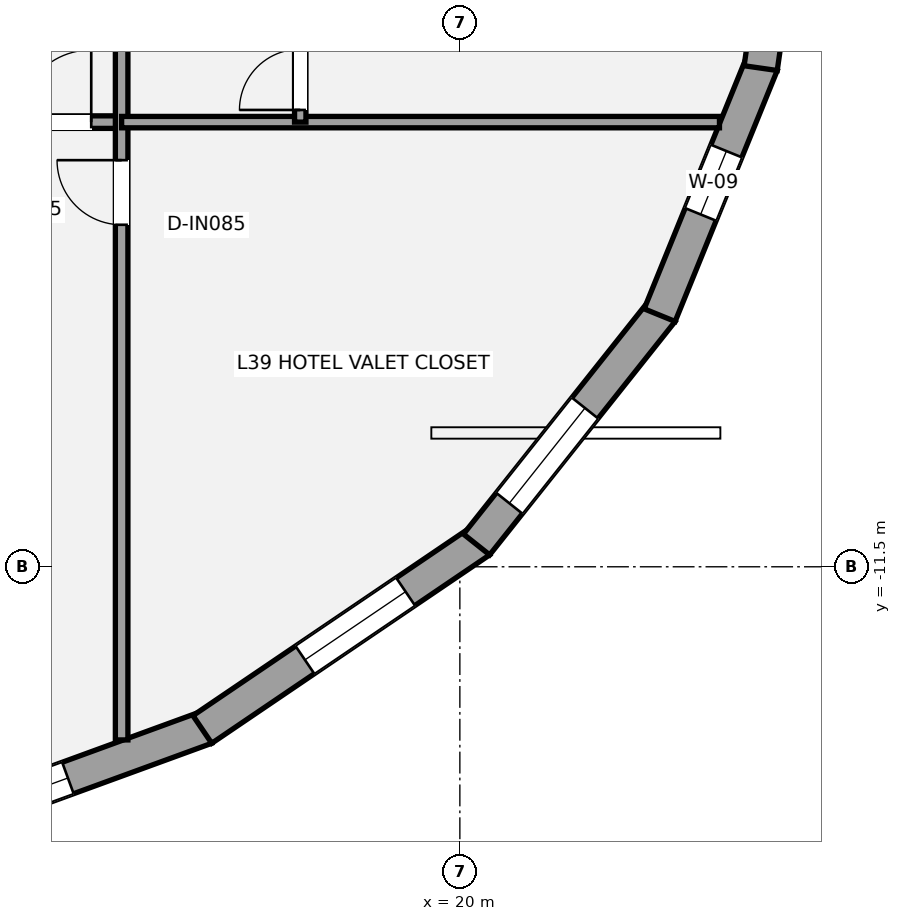
"""IFC4 building model, lengths in metres.
Left out: names, types, materials, properties, quantities, classifications, styles, units other than length and angle.
Written with IfcOpenShell. Run it as: python <this file> out.ifc"""

import sys

from ifc_helpers import new_model, si_unit, direction, frame, frame_2d, origin, place, context, subcontext, project, spatial, rectangle, extrude, element, fill, save


model = new_model("IFC4")
c1 = context("Model", 3, precision=1e-05, world=origin(), true_north=direction((0.0, 1.0)))
c2 = subcontext(c1, "Body", "Model", "MODEL_VIEW")
j1 = project(units=[si_unit("LENGTHUNIT", "METRE"), si_unit("PLANEANGLEUNIT", "RADIAN")], contexts=[c1])
p1 = place(None, origin())
s1 = spatial("IfcSite", under=j1, at=p1, CompositionType="ELEMENT")
p2 = place(p1, origin())
s2 = spatial("IfcBuilding", under=s1, at=p2, CompositionType="ELEMENT")
p3 = place(p2, frame((0.0, 0.0, 147.0)))
s3 = spatial("IfcBuildingStorey", under=s2, at=p3, CompositionType="ELEMENT", Elevation=147.0)
p4 = place(p3, frame((16.66, -13.615, 0.0), z_axis=(0.0, 0.0, 1.0), x_axis=(-0.939349296455, -0.342961950147, 0.0)))
e1 = element("IfcWall", 1, at=p4, inside=s3, PredefinedType="STANDARD", context=c2, shape_type="SweptSolid", body=[
    extrude(rectangle(XDim=4.823, YDim=0.44, at=frame_2d((2.412, 0.0))), origin(), (0.0, 0.0, 1.0), 2.315),
])
p5 = place(p4, frame((1.934, 0.0, 0.58)))
e2 = element("IfcOpeningElement", 2, at=p5, cuts=e1, PredefinedType="OPENING", context=c2, shape_type="SweptSolid", body=[
    extrude(rectangle(XDim=1.6, YDim=1.55, at=frame_2d((0.8, 0.775))), frame((0.0, 0.23, 0.0), z_axis=(0.0, -1.0, 0.0), x_axis=(1.0, 0.0, 0.0)), (0.0, 0.0, 1.0), 0.46),
])
p6 = place(p3, frame((20.269, -11.162, 0.0), z_axis=(0.0, 0.0, 1.0), x_axis=(-0.827774624611, -0.561060755044, 0.0)))
e3 = element("IfcWall", 3, at=p6, inside=s3, PredefinedType="STANDARD", context=c2, shape_type="SweptSolid", body=[
    extrude(rectangle(XDim=4.417, YDim=0.44, at=frame_2d((2.209, 0.0))), origin(), (0.0, 0.0, 1.0), 2.315),
])
p7 = place(p6, frame((1.187, 0.0, 0.58)))
e4 = element("IfcOpeningElement", 4, at=p7, cuts=e3, PredefinedType="OPENING", context=c2, shape_type="SweptSolid", body=[
    extrude(rectangle(XDim=1.6, YDim=1.55, at=frame_2d((0.8, 0.775))), frame((0.0, 0.23, 0.0), z_axis=(0.0, -1.0, 0.0), x_axis=(1.0, 0.0, 0.0)), (0.0, 0.0, 1.0), 0.46),
])
p8 = place(p3, frame((22.66, -8.135, 0.0), z_axis=(0.0, 0.0, 1.0), x_axis=(-0.622149266174, -0.782898646441, 0.0)))
e5 = element("IfcWall", 5, at=p8, inside=s3, PredefinedType="STANDARD", context=c2, shape_type="SweptSolid", body=[
    extrude(rectangle(XDim=3.923, YDim=0.44, at=frame_2d((1.961, 0.0))), origin(), (0.0, 0.0, 1.0), 2.315),
])
p9 = place(p8, frame((1.63, 0.0, 0.58)))
e6 = element("IfcOpeningElement", 6, at=p9, cuts=e5, PredefinedType="OPENING", context=c2, shape_type="SweptSolid", body=[
    extrude(rectangle(XDim=1.6, YDim=1.55, at=frame_2d((0.8, 0.775))), frame((0.0, 0.23, 0.0), z_axis=(0.0, -1.0, 0.0), x_axis=(1.0, 0.0, 0.0)), (0.0, 0.0, 1.0), 0.46),
])
p10 = place(p3, frame((23.972, -4.888, 0.0), z_axis=(0.0, 0.0, 1.0), x_axis=(-0.376863872061, -0.926268655378, 0.0)))
e7 = element("IfcWall", 7, at=p10, inside=s3, PredefinedType="STANDARD", context=c2, shape_type="SweptSolid", body=[
    extrude(rectangle(XDim=3.564, YDim=0.44, at=frame_2d((1.782, 0.0))), origin(), (0.0, 0.0, 1.0), 2.315),
])
p11 = place(p10, frame((1.234, 0.0, 0.58)))
e8 = element("IfcOpeningElement", 8, at=p11, cuts=e7, PredefinedType="OPENING", context=c2, shape_type="SweptSolid", body=[
    extrude(rectangle(XDim=0.9, YDim=1.35, at=frame_2d((0.45, 0.675))), frame((0.0, 0.23, 0.0), z_axis=(0.0, -1.0, 0.0), x_axis=(1.0, 0.0, 0.0)), (0.0, 0.0, 1.0), 0.46),
])
p12 = place(p3, frame((24.436, -1.615, 0.0), z_axis=(0.0, 0.0, 1.0), x_axis=(-0.142296299692, -0.989824107149, 0.0)))
e9 = element("IfcWall", 9, at=p12, inside=s3, PredefinedType="STANDARD", context=c2, shape_type="SweptSolid", body=[
    extrude(rectangle(XDim=3.359, YDim=0.44, at=frame_2d((1.68, 0.0))), origin(), (0.0, 0.0, 1.0), 2.315),
])
p13 = place(p12, frame((1.414, 0.0, 0.58)))
e10 = element("IfcOpeningElement", 10, at=p13, cuts=e9, PredefinedType="OPENING", context=c2, shape_type="SweptSolid", body=[
    extrude(rectangle(XDim=1.6, YDim=1.55, at=frame_2d((0.8, 0.775))), frame((0.0, 0.23, 0.0), z_axis=(0.0, -1.0, 0.0), x_axis=(1.0, 0.0, 0.0)), (0.0, 0.0, 1.0), 0.46),
])
p14 = place(p3, frame((-15.55, -5.65, 0.0), z_axis=(0.0, 0.0, 1.0), x_axis=(1.0, 0.0, 0.0)))
e11 = element("IfcWall", 11, at=p14, inside=s3, PredefinedType="PARTITIONING", context=c2, shape_type="SweptSolid", body=[
    extrude(rectangle(XDim=31.1, YDim=0.165, at=frame_2d((15.55, 0.0))), origin(), (0.0, 0.0, 1.0), 2.398),
])
p15 = place(p14, frame((4.6, 0.0, 0.0)))
e12 = element("IfcOpeningElement", 12, at=p15, cuts=e11, PredefinedType="OPENING", context=c2, shape_type="SweptSolid", body=[
    extrude(rectangle(XDim=0.95, YDim=2.15, at=frame_2d((0.475, 1.075))), frame((0.0, 0.093, 0.0), z_axis=(0.0, -1.0, 0.0), x_axis=(1.0, 0.0, 0.0)), (0.0, 0.0, 1.0), 0.185),
])
p16 = place(p14, frame((11.0, 0.0, 0.0)))
e13 = element("IfcOpeningElement", 13, at=p16, cuts=e11, PredefinedType="OPENING", context=c2, shape_type="SweptSolid", body=[
    extrude(rectangle(XDim=0.95, YDim=2.15, at=frame_2d((0.475, 1.075))), frame((0.0, 0.093, 0.0), z_axis=(0.0, -1.0, 0.0), x_axis=(1.0, 0.0, 0.0)), (0.0, 0.0, 1.0), 0.185),
])
p17 = place(p14, frame((17.4, 0.0, 0.0)))
e14 = element("IfcOpeningElement", 14, at=p17, cuts=e11, PredefinedType="OPENING", context=c2, shape_type="SweptSolid", body=[
    extrude(rectangle(XDim=0.95, YDim=2.15, at=frame_2d((0.475, 1.075))), frame((0.0, 0.093, 0.0), z_axis=(0.0, -1.0, 0.0), x_axis=(1.0, 0.0, 0.0)), (0.0, 0.0, 1.0), 0.185),
])
p18 = place(p14, frame((23.8, 0.0, 0.0)))
e15 = element("IfcOpeningElement", 15, at=p18, cuts=e11, PredefinedType="OPENING", context=c2, shape_type="SweptSolid", body=[
    extrude(rectangle(XDim=0.95, YDim=2.15, at=frame_2d((0.475, 1.075))), frame((0.0, 0.093, 0.0), z_axis=(0.0, -1.0, 0.0), x_axis=(1.0, 0.0, 0.0)), (0.0, 0.0, 1.0), 0.185),
])
p19 = place(p14, frame((29.75, 0.0, 0.0)))
e16 = element("IfcOpeningElement", 16, at=p19, cuts=e11, PredefinedType="OPENING", context=c2, shape_type="SweptSolid", body=[
    extrude(rectangle(XDim=0.95, YDim=2.15, at=frame_2d((0.475, 1.075))), frame((0.0, 0.093, 0.0), z_axis=(0.0, -1.0, 0.0), x_axis=(1.0, 0.0, 0.0)), (0.0, 0.0, 1.0), 0.185),
])
p20 = place(p3, frame((15.55, -13.778, 0.0), z_axis=(0.0, 0.0, 1.0), x_axis=(0.0, 1.0, 0.0)))
e17 = element("IfcWall", 17, at=p20, inside=s3, PredefinedType="PARTITIONING", context=c2, shape_type="SweptSolid", body=[
    extrude(rectangle(XDim=21.328, YDim=0.165, at=frame_2d((10.664, 0.0))), origin(), (0.0, 0.0, 1.0), 2.473),
])
p21 = place(p20, frame((6.777, 0.0, 0.0)))
e18 = element("IfcOpeningElement", 18, at=p21, cuts=e17, PredefinedType="OPENING", context=c2, shape_type="SweptSolid", body=[
    extrude(rectangle(XDim=0.85, YDim=2.1, at=frame_2d((0.425, 1.05))), frame((0.0, 0.093, 0.0), z_axis=(0.0, -1.0, 0.0), x_axis=(1.0, 0.0, 0.0)), (0.0, 0.0, 1.0), 0.185),
])
p22 = place(p20, frame((10.827, 0.0, 0.0)))
e19 = element("IfcOpeningElement", 19, at=p22, cuts=e17, PredefinedType="OPENING", context=c2, shape_type="SweptSolid", body=[
    extrude(rectangle(XDim=0.95, YDim=2.15, at=frame_2d((0.475, 1.075))), frame((0.0, 0.093, 0.0), z_axis=(0.0, -1.0, 0.0), x_axis=(1.0, 0.0, 0.0)), (0.0, 0.0, 1.0), 0.185),
])
p23 = place(p20, frame((15.227, 0.0, 0.0)))
e20 = element("IfcOpeningElement", 20, at=p23, cuts=e17, PredefinedType="OPENING", context=c2, shape_type="SweptSolid", body=[
    extrude(rectangle(XDim=0.95, YDim=2.15, at=frame_2d((0.475, 1.075))), frame((0.0, 0.093, 0.0), z_axis=(0.0, -1.0, 0.0), x_axis=(1.0, 0.0, 0.0)), (0.0, 0.0, 1.0), 0.185),
])
p24 = place(p20, frame((19.977, 0.0, 0.0)))
e21 = element("IfcOpeningElement", 21, at=p24, cuts=e17, PredefinedType="OPENING", context=c2, shape_type="SweptSolid", body=[
    extrude(rectangle(XDim=0.95, YDim=2.15, at=frame_2d((0.475, 1.075))), frame((0.0, 0.093, 0.0), z_axis=(0.0, -1.0, 0.0), x_axis=(1.0, 0.0, 0.0)), (0.0, 0.0, 1.0), 0.185),
])
p25 = place(p3, frame((15.55, -5.65, 0.0), z_axis=(0.0, 0.0, 1.0), x_axis=(1.0, 0.0, 0.0)))
e22 = element("IfcWall", 22, at=p25, inside=s3, PredefinedType="PLUMBINGWALL", context=c2, shape_type="SweptSolid", body=[
    extrude(rectangle(XDim=7.866, YDim=0.15, at=frame_2d((3.933, 0.0))), origin(), (0.0, 0.0, 1.0), 2.473),
])
p26 = place(p3, frame((17.9, -5.65, 0.0), z_axis=(0.0, 0.0, 1.0), x_axis=(0.0, 1.0, 0.0)))
e23 = element("IfcWall", 23, at=p26, inside=s3, PredefinedType="PLUMBINGWALL", context=c2, shape_type="SweptSolid", body=[
    extrude(rectangle(XDim=2.15, YDim=0.15, at=frame_2d((1.075, 0.0))), origin(), (0.0, 0.0, 1.0), 2.473),
])
p27 = place(p26, frame((0.16, 0.0, 0.0)))
e24 = element("IfcOpeningElement", 24, at=p27, cuts=e23, PredefinedType="OPENING", context=c2, shape_type="SweptSolid", body=[
    extrude(rectangle(XDim=0.8, YDim=2.1, at=frame_2d((0.4, 1.05))), frame((0.0, 0.085, 0.0), z_axis=(0.0, -1.0, 0.0), x_axis=(1.0, 0.0, 0.0)), (0.0, 0.0, 1.0), 0.17),
])
p28 = place(p5, origin())
e25 = element("IfcWindow", 25, at=p28, inside=s3, PartitioningType="SINGLE_PANEL", PredefinedType="WINDOW", context=c2, shape_type="SweptSolid", body=[
    extrude(rectangle(XDim=1.6, YDim=1.55, at=frame_2d((0.8, 0.775))), frame((0.0, -0.01, 0.0), z_axis=(0.0, -1.0, 0.0), x_axis=(1.0, 0.0, 0.0)), (0.0, 0.0, 1.0), 0.06),
])
fill(e2, e25)
p29 = place(p7, origin())
e26 = element("IfcWindow", 26, at=p29, inside=s3, PartitioningType="SINGLE_PANEL", PredefinedType="WINDOW", context=c2, shape_type="SweptSolid", body=[
    extrude(rectangle(XDim=1.6, YDim=1.55, at=frame_2d((0.8, 0.775))), frame((0.0, -0.01, 0.0), z_axis=(0.0, -1.0, 0.0), x_axis=(1.0, 0.0, 0.0)), (0.0, 0.0, 1.0), 0.06),
])
fill(e4, e26)
p30 = place(p9, origin())
e27 = element("IfcWindow", 27, at=p30, inside=s3, PartitioningType="SINGLE_PANEL", PredefinedType="WINDOW", context=c2, shape_type="SweptSolid", body=[
    extrude(rectangle(XDim=1.6, YDim=1.55, at=frame_2d((0.8, 0.775))), frame((0.0, -0.01, 0.0), z_axis=(0.0, -1.0, 0.0), x_axis=(1.0, 0.0, 0.0)), (0.0, 0.0, 1.0), 0.06),
])
fill(e6, e27)
p31 = place(p11, origin())
e28 = element("IfcWindow", 28, at=p31, inside=s3, PartitioningType="SINGLE_PANEL", PredefinedType="WINDOW", context=c2, shape_type="SweptSolid", body=[
    extrude(rectangle(XDim=0.9, YDim=1.35, at=frame_2d((0.45, 0.675))), frame((0.0, -0.01, 0.0), z_axis=(0.0, -1.0, 0.0), x_axis=(1.0, 0.0, 0.0)), (0.0, 0.0, 1.0), 0.06),
])
fill(e8, e28)
p32 = place(p21, origin())
e29 = element("IfcDoor", 29, at=p32, inside=s3, OperationType="SINGLE_SWING_RIGHT", PredefinedType="DOOR", context=c2, shape_type="SweptSolid", body=[
    extrude(rectangle(XDim=0.85, YDim=2.1, at=frame_2d((0.425, 1.05))), frame((0.0, 0.025, 0.0), z_axis=(0.0, -1.0, 0.0), x_axis=(1.0, 0.0, 0.0)), (0.0, 0.0, 1.0), 0.05),
])
fill(e18, e29)
p33 = place(p19, origin())
e30 = element("IfcDoor", 30, at=p33, inside=s3, OperationType="SINGLE_SWING_RIGHT", PredefinedType="DOOR", context=c2, shape_type="SweptSolid", body=[
    extrude(rectangle(XDim=0.95, YDim=2.15, at=frame_2d((0.475, 1.075))), frame((0.0, 0.025, 0.0), z_axis=(0.0, -1.0, 0.0), x_axis=(1.0, 0.0, 0.0)), (0.0, 0.0, 1.0), 0.05),
])
fill(e16, e30)
p34 = place(p27, origin())
e31 = element("IfcDoor", 31, at=p34, inside=s3, OperationType="SINGLE_SWING_LEFT", PredefinedType="DOOR", context=c2, shape_type="SweptSolid", body=[
    extrude(rectangle(XDim=0.8, YDim=2.1, at=frame_2d((0.4, 1.05))), frame((0.0, 0.025, 0.0), z_axis=(0.0, -1.0, 0.0), x_axis=(1.0, 0.0, 0.0)), (0.0, 0.0, 1.0), 0.05),
])
fill(e24, e31)
save(model, sys.argv[1])
